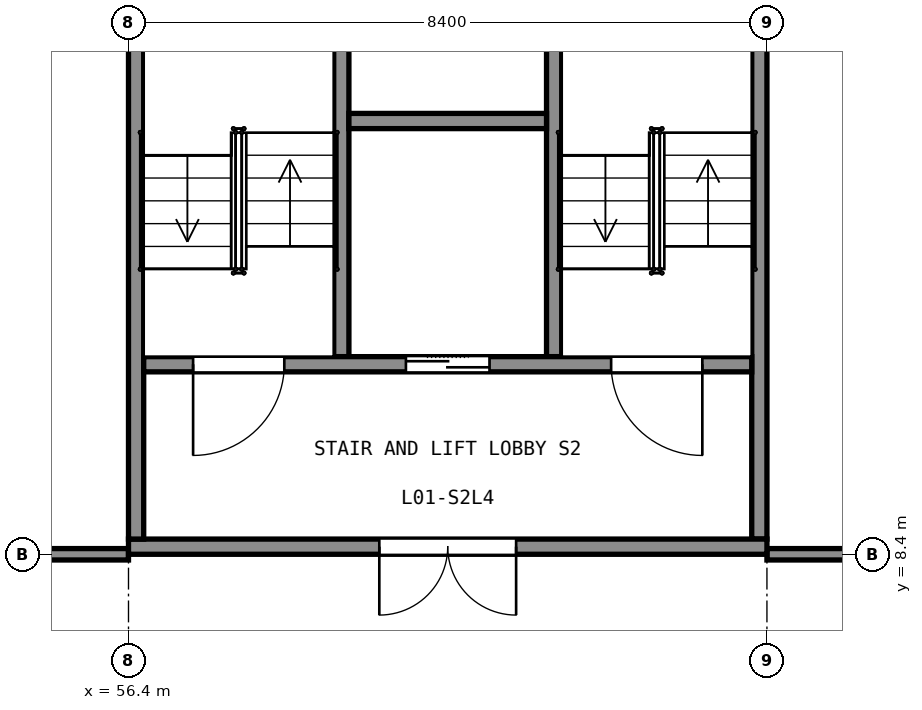
"""IFC4 building model, lengths in metres.
Left out: names, types, materials, properties, quantities, classifications, styles, units other than length and angle.
Written with IfcOpenShell. Run it as: python <this file> out.ifc"""

import sys

from ifc_helpers import new_model, si_unit, direction, frame, frame_2d, origin, place, context, subcontext, project, spatial, rectangle, extrude, element, fill, save


model = new_model("IFC4")
c1 = context("Model", 3, precision=1e-05, world=origin(), true_north=direction((0.0, 1.0)))
c2 = subcontext(c1, "Body", "Model", "MODEL_VIEW")
j1 = project(units=[si_unit("LENGTHUNIT", "METRE"), si_unit("PLANEANGLEUNIT", "RADIAN")], contexts=[c1])
p1 = place(None, origin())
s1 = spatial("IfcSite", under=j1, at=p1, CompositionType="ELEMENT")
p2 = place(p1, origin())
s2 = spatial("IfcBuilding", under=s1, at=p2, CompositionType="ELEMENT")
p3 = place(p2, frame((0.0, 0.0, 5.5)))
s3 = spatial("IfcBuildingStorey", under=s2, at=p3, CompositionType="ELEMENT", Elevation=5.5)
p4 = place(p3, frame((56.4, 8.5, 0.0), z_axis=(0.0, 0.0, 1.0), x_axis=(1.0, 0.0, 0.0)))
e1 = element("IfcWall", 1, at=p4, inside=s3, PredefinedType="SHEAR", context=c2, shape_type="SweptSolid", body=[
    extrude(rectangle(XDim=8.4, YDim=0.2, at=frame_2d((4.2, 0.0))), origin(), (0.0, 0.0, 1.0), 5.0),
])
p5 = place(p4, frame((3.3, 0.0, 0.0)))
e2 = element("IfcOpeningElement", 2, at=p5, cuts=e1, PredefinedType="OPENING", context=c2, shape_type="SweptSolid", body=[
    extrude(rectangle(XDim=1.8, YDim=2.1, at=frame_2d((0.9, 1.05))), frame((0.0, 0.11, 0.0), z_axis=(0.0, -1.0, 0.0), x_axis=(1.0, 0.0, 0.0)), (0.0, 0.0, 1.0), 0.22),
])
for number, where, z_axis, x_axis in (
    (3, (56.5, 8.6, 0.0), (0.0, 0.0, 1.0), (0.0, 1.0, 0.0)),
    (4, (64.7, 8.6, 0.0), (0.0, 0.0, 1.0), (0.0, 1.0, 0.0)),
):
    element("IfcWall", number, at=place(p3, frame(where, z_axis=z_axis, x_axis=x_axis)), inside=s3, PredefinedType="SHEAR", context=c2, shape_type="SweptSolid", body=[
        extrude(rectangle(XDim=8.0, YDim=0.2, at=frame_2d((4.0, 0.0))), origin(), (0.0, 0.0, 1.0), 5.0),
    ])
p6 = place(p3, frame((56.6, 10.9, 0.0), z_axis=(0.0, 0.0, 1.0), x_axis=(1.0, 0.0, 0.0)))
e5 = element("IfcWall", 5, at=p6, inside=s3, PredefinedType="SHEAR", context=c2, shape_type="SweptSolid", body=[
    extrude(rectangle(XDim=8.0, YDim=0.2, at=frame_2d((4.0, 0.0))), origin(), (0.0, 0.0, 1.0), 5.0),
])
p7 = place(p6, frame((0.65, 0.0, 0.0)))
e6 = element("IfcOpeningElement", 6, at=p7, cuts=e5, PredefinedType="OPENING", context=c2, shape_type="SweptSolid", body=[
    extrude(rectangle(XDim=1.2, YDim=2.1, at=frame_2d((0.6, 1.05))), frame((0.0, 0.11, 0.0), z_axis=(0.0, -1.0, 0.0), x_axis=(1.0, 0.0, 0.0)), (0.0, 0.0, 1.0), 0.22),
])
p8 = place(p6, frame((6.15, 0.0, 0.0)))
e7 = element("IfcOpeningElement", 7, at=p8, cuts=e5, PredefinedType="OPENING", context=c2, shape_type="SweptSolid", body=[
    extrude(rectangle(XDim=1.2, YDim=2.1, at=frame_2d((0.6, 1.05))), frame((0.0, 0.11, 0.0), z_axis=(0.0, -1.0, 0.0), x_axis=(1.0, 0.0, 0.0)), (0.0, 0.0, 1.0), 0.22),
])
p9 = place(p6, frame((3.45, 0.0, 0.0)))
e8 = element("IfcOpeningElement", 8, at=p9, cuts=e5, PredefinedType="OPENING", context=c2, shape_type="SweptSolid", body=[
    extrude(rectangle(XDim=1.1, YDim=2.1, at=frame_2d((0.55, 1.05))), frame((0.0, 0.11, 0.0), z_axis=(0.0, -1.0, 0.0), x_axis=(1.0, 0.0, 0.0)), (0.0, 0.0, 1.0), 0.22),
])
for number, where, z_axis, x_axis in (
    (9, (59.2, 11.0, 0.0), (0.0, 0.0, 1.0), (0.0, 1.0, 0.0)),
    (10, (62.0, 11.0, 0.0), (0.0, 0.0, 1.0), (0.0, 1.0, 0.0)),
):
    element("IfcWall", number, at=place(p3, frame(where, z_axis=z_axis, x_axis=x_axis)), inside=s3, PredefinedType="SHEAR", context=c2, shape_type="SweptSolid", body=[
        extrude(rectangle(XDim=5.6, YDim=0.2, at=frame_2d((2.8, 0.0))), origin(), (0.0, 0.0, 1.0), 5.0),
    ])
p10 = place(p3, frame((59.3, 14.1, 0.0), z_axis=(0.0, 0.0, 1.0), x_axis=(1.0, 0.0, 0.0)))
e11 = element("IfcWall", 11, at=p10, inside=s3, PredefinedType="SHEAR", context=c2, shape_type="SweptSolid", body=[
    extrude(rectangle(XDim=2.6, YDim=0.2, at=frame_2d((1.3, 0.0))), origin(), (0.0, 0.0, 1.0), 5.0),
])
p11 = place(p3, frame((48.4, 8.4, 0.0), z_axis=(0.0, 0.0, 1.0), x_axis=(1.0, 0.0, 0.0)))
e12 = element("IfcWall", 12, at=p11, inside=s3, PredefinedType="PARTITIONING", context=c2, shape_type="SweptSolid", body=[
    extrude(rectangle(XDim=8.0, YDim=0.15, at=frame_2d((4.0, 0.0))), origin(), (0.0, 0.0, 1.0), 3.9),
])
p12 = place(p11, frame((4.875, 0.0, 0.0)))
e13 = element("IfcOpeningElement", 13, at=p12, cuts=e12, PredefinedType="OPENING", context=c2, shape_type="SweptSolid", body=[
    extrude(rectangle(XDim=1.8, YDim=2.1, at=frame_2d((0.9, 1.05))), frame((0.0, 0.085, 0.0), z_axis=(0.0, -1.0, 0.0), x_axis=(1.0, 0.0, 0.0)), (0.0, 0.0, 1.0), 0.17),
])
p13 = place(p3, frame((64.8, 8.4, 0.0), z_axis=(0.0, 0.0, 1.0), x_axis=(1.0, 0.0, 0.0)))
e14 = element("IfcWall", 14, at=p13, inside=s3, PredefinedType="PARTITIONING", context=c2, shape_type="SweptSolid", body=[
    extrude(rectangle(XDim=8.0, YDim=0.15, at=frame_2d((4.0, 0.0))), origin(), (0.0, 0.0, 1.0), 3.9),
])
p14 = place(p13, frame((1.325, 0.0, 0.0)))
e15 = element("IfcOpeningElement", 15, at=p14, cuts=e14, PredefinedType="OPENING", context=c2, shape_type="SweptSolid", body=[
    extrude(rectangle(XDim=1.8, YDim=2.1, at=frame_2d((0.9, 1.05))), frame((0.0, 0.085, 0.0), z_axis=(0.0, -1.0, 0.0), x_axis=(1.0, 0.0, 0.0)), (0.0, 0.0, 1.0), 0.17),
])
p15 = place(p5, origin())
e16 = element("IfcDoor", 16, at=p15, inside=s3, OperationType="DOUBLE_DOOR_SINGLE_SWING", PredefinedType="DOOR", context=c2, shape_type="SweptSolid", body=[
    extrude(rectangle(XDim=1.8, YDim=2.1, at=frame_2d((0.9, 1.05))), frame((0.0, 0.025, 0.0), z_axis=(0.0, -1.0, 0.0), x_axis=(1.0, 0.0, 0.0)), (0.0, 0.0, 1.0), 0.05),
])
fill(e2, e16)
p16 = place(p7, origin())
e17 = element("IfcDoor", 17, at=p16, inside=s3, OperationType="SINGLE_SWING_LEFT", PredefinedType="DOOR", context=c2, shape_type="SweptSolid", body=[
    extrude(rectangle(XDim=1.2, YDim=2.1, at=frame_2d((0.6, 1.05))), frame((0.0, 0.025, 0.0), z_axis=(0.0, -1.0, 0.0), x_axis=(1.0, 0.0, 0.0)), (0.0, 0.0, 1.0), 0.05),
])
fill(e6, e17)
p17 = place(p8, origin())
e18 = element("IfcDoor", 18, at=p17, inside=s3, OperationType="SINGLE_SWING_RIGHT", PredefinedType="DOOR", context=c2, shape_type="SweptSolid", body=[
    extrude(rectangle(XDim=1.2, YDim=2.1, at=frame_2d((0.6, 1.05))), frame((0.0, 0.025, 0.0), z_axis=(0.0, -1.0, 0.0), x_axis=(1.0, 0.0, 0.0)), (0.0, 0.0, 1.0), 0.05),
])
fill(e7, e18)
p18 = place(p9, origin())
e19 = element("IfcDoor", 19, at=p18, inside=s3, OperationType="DOUBLE_DOOR_SLIDING", PredefinedType="DOOR", context=c2, shape_type="SweptSolid", body=[
    extrude(rectangle(XDim=1.1, YDim=2.1, at=frame_2d((0.55, 1.05))), frame((0.0, 0.025, 0.0), z_axis=(0.0, -1.0, 0.0), x_axis=(1.0, 0.0, 0.0)), (0.0, 0.0, 1.0), 0.05),
])
fill(e8, e19)
save(model, sys.argv[1])
